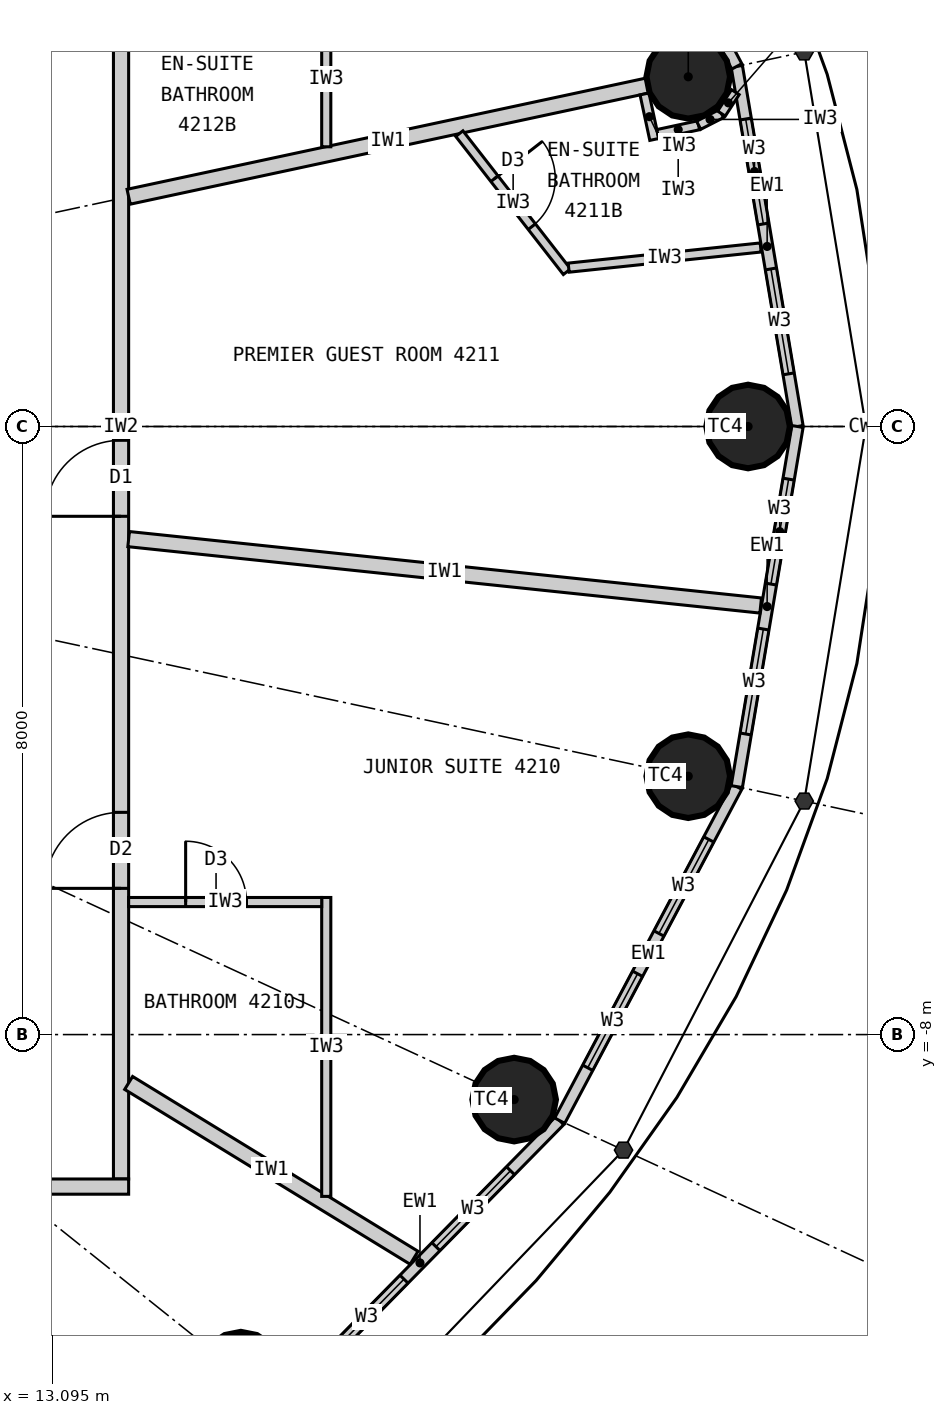
"""IFC4 building model, lengths in metres.
Left out: names, types, materials, properties, quantities, classifications, styles, units other than length and angle.
Written with IfcOpenShell. Run it as: python <this file> out.ifc"""

import sys

from ifc_helpers import new_model, si_unit, direction, frame, frame_2d, origin, origin_2d, place, context, subcontext, project, spatial, rectangle, circle, extrude, element, fill, save


model = new_model("IFC4")
c1 = context("Model", 3, precision=1e-05, world=origin(), true_north=direction((0.0, 1.0)))
c2 = subcontext(c1, "Body", "Model", "MODEL_VIEW")
j1 = project(units=[si_unit("LENGTHUNIT", "METRE"), si_unit("PLANEANGLEUNIT", "RADIAN")], contexts=[c1])
p1 = place(None, origin())
s1 = spatial("IfcSite", under=j1, at=p1, CompositionType="ELEMENT")
p2 = place(p1, origin())
s2 = spatial("IfcBuilding", under=s1, at=p2, CompositionType="ELEMENT")
p3 = place(p2, frame((0.0, 0.0, 159.9)))
s3 = spatial("IfcBuildingStorey", under=s2, at=p3, CompositionType="ELEMENT", Elevation=159.9)
for number, where, z_axis, x_axis in (
    (1, (22.25, 0.0, 0.0), (0.0, 0.0, 1.0), (1.0, 0.0, 0.0)),
    (2, (21.463, 4.601, 0.0), (0.0, 0.0, 1.0), (1.0, 0.0, 0.0)),
    (3, (15.576, -12.461, 0.0), (0.0, 0.0, 1.0), (1.0, 0.0, 0.0)),
    (4, (19.172, -8.855, 0.0), (0.0, 0.0, 1.0), (1.0, 0.0, 0.0)),
    (5, (21.463, -4.601, 0.0), (0.0, 0.0, 1.0), (1.0, 0.0, 0.0)),
):
    element("IfcColumn", number, at=place(p3, frame(where, z_axis=z_axis, x_axis=x_axis)), inside=s3, PredefinedType="COLUMN", context=c2, shape_type="SweptSolid", body=[
        extrude(circle(Radius=0.55, at=origin_2d()), origin(), (0.0, 0.0, 1.0), 3.3),
    ])
p4 = place(p3, frame((22.9, 0.0, 0.0), z_axis=(0.0, 0.0, 1.0), x_axis=(-0.166162111254, 0.986098449843, 0.0)))
e6 = element("IfcWall", 6, at=p4, inside=s3, PredefinedType="ELEMENTEDWALL", context=c2, shape_type="SweptSolid", body=[
    extrude(rectangle(XDim=4.805, YDim=0.15, at=frame_2d((2.402, 0.0))), origin(), (0.0, 0.0, 1.0), 3.12),
])
p5 = place(p4, frame((0.702, 0.0, 0.9)))
e7 = element("IfcOpeningElement", 7, at=p5, cuts=e6, PredefinedType="OPENING", context=c2, shape_type="SweptSolid", body=[
    extrude(rectangle(XDim=1.4, YDim=1.9, at=frame_2d((0.7, 0.95))), frame((0.0, 0.085, 0.0), z_axis=(0.0, -1.0, 0.0), x_axis=(1.0, 0.0, 0.0)), (0.0, 0.0, 1.0), 0.17),
])
p6 = place(p4, frame((2.702, 0.0, 0.9)))
e8 = element("IfcOpeningElement", 8, at=p6, cuts=e6, PredefinedType="OPENING", context=c2, shape_type="SweptSolid", body=[
    extrude(rectangle(XDim=1.4, YDim=1.9, at=frame_2d((0.7, 0.95))), frame((0.0, 0.085, 0.0), z_axis=(0.0, -1.0, 0.0), x_axis=(1.0, 0.0, 0.0)), (0.0, 0.0, 1.0), 0.17),
])
p7 = place(p3, frame((22.102, 4.738, 0.0), z_axis=(0.0, 0.0, 1.0), x_axis=(-0.468428906714, 0.883501193748, 0.0)))
e9 = element("IfcWall", 9, at=p7, inside=s3, PredefinedType="ELEMENTEDWALL", context=c2, shape_type="SweptSolid", body=[
    extrude(rectangle(XDim=4.974, YDim=0.15, at=frame_2d((2.487, 0.0))), origin(), (0.0, 0.0, 1.0), 3.12),
])
p8 = place(p7, frame((0.787, 0.0, 0.9)))
e10 = element("IfcOpeningElement", 10, at=p8, cuts=e9, PredefinedType="OPENING", context=c2, shape_type="SweptSolid", body=[
    extrude(rectangle(XDim=1.4, YDim=1.9, at=frame_2d((0.7, 0.95))), frame((0.0, 0.085, 0.0), z_axis=(0.0, -1.0, 0.0), x_axis=(1.0, 0.0, 0.0)), (0.0, 0.0, 1.0), 0.17),
])
p9 = place(p7, frame((2.787, 0.0, 0.9)))
e11 = element("IfcOpeningElement", 11, at=p9, cuts=e9, PredefinedType="OPENING", context=c2, shape_type="SweptSolid", body=[
    extrude(rectangle(XDim=1.4, YDim=1.9, at=frame_2d((0.7, 0.95))), frame((0.0, 0.085, 0.0), z_axis=(0.0, -1.0, 0.0), x_axis=(1.0, 0.0, 0.0)), (0.0, 0.0, 1.0), 0.17),
])
p10 = place(p3, frame((16.095, -12.876, 0.0), z_axis=(0.0, 0.0, 1.0), x_axis=(0.700727467776, 0.71342905457, 0.0)))
e12 = element("IfcWall", 12, at=p10, inside=s3, PredefinedType="ELEMENTEDWALL", context=c2, shape_type="SweptSolid", body=[
    extrude(rectangle(XDim=5.247, YDim=0.15, at=frame_2d((2.624, 0.0))), origin(), (0.0, 0.0, 1.0), 3.12),
])
p11 = place(p10, frame((0.924, 0.0, 0.9)))
e13 = element("IfcOpeningElement", 13, at=p11, cuts=e12, PredefinedType="OPENING", context=c2, shape_type="SweptSolid", body=[
    extrude(rectangle(XDim=1.4, YDim=1.9, at=frame_2d((0.7, 0.95))), frame((0.0, 0.085, 0.0), z_axis=(0.0, -1.0, 0.0), x_axis=(1.0, 0.0, 0.0)), (0.0, 0.0, 1.0), 0.17),
])
p12 = place(p10, frame((2.924, 0.0, 0.9)))
e14 = element("IfcOpeningElement", 14, at=p12, cuts=e12, PredefinedType="OPENING", context=c2, shape_type="SweptSolid", body=[
    extrude(rectangle(XDim=1.4, YDim=1.9, at=frame_2d((0.7, 0.95))), frame((0.0, 0.085, 0.0), z_axis=(0.0, -1.0, 0.0), x_axis=(1.0, 0.0, 0.0)), (0.0, 0.0, 1.0), 0.17),
])
p13 = place(p3, frame((19.772, -9.132, 0.0), z_axis=(0.0, 0.0, 1.0), x_axis=(0.468428906714, 0.883501193748, 0.0)))
e15 = element("IfcWall", 15, at=p13, inside=s3, PredefinedType="ELEMENTEDWALL", context=c2, shape_type="SweptSolid", body=[
    extrude(rectangle(XDim=4.974, YDim=0.15, at=frame_2d((2.487, 0.0))), origin(), (0.0, 0.0, 1.0), 3.12),
])
p14 = place(p13, frame((0.787, 0.0, 0.9)))
e16 = element("IfcOpeningElement", 16, at=p14, cuts=e15, PredefinedType="OPENING", context=c2, shape_type="SweptSolid", body=[
    extrude(rectangle(XDim=1.4, YDim=1.9, at=frame_2d((0.7, 0.95))), frame((0.0, 0.085, 0.0), z_axis=(0.0, -1.0, 0.0), x_axis=(1.0, 0.0, 0.0)), (0.0, 0.0, 1.0), 0.17),
])
p15 = place(p13, frame((2.787, 0.0, 0.9)))
e17 = element("IfcOpeningElement", 17, at=p15, cuts=e15, PredefinedType="OPENING", context=c2, shape_type="SweptSolid", body=[
    extrude(rectangle(XDim=1.4, YDim=1.9, at=frame_2d((0.7, 0.95))), frame((0.0, 0.085, 0.0), z_axis=(0.0, -1.0, 0.0), x_axis=(1.0, 0.0, 0.0)), (0.0, 0.0, 1.0), 0.17),
])
p16 = place(p3, frame((22.102, -4.738, 0.0), z_axis=(0.0, 0.0, 1.0), x_axis=(0.166162111254, 0.986098449843, 0.0)))
e18 = element("IfcWall", 18, at=p16, inside=s3, PredefinedType="ELEMENTEDWALL", context=c2, shape_type="SweptSolid", body=[
    extrude(rectangle(XDim=4.805, YDim=0.15, at=frame_2d((2.402, 0.0))), origin(), (0.0, 0.0, 1.0), 3.12),
])
p17 = place(p16, frame((0.702, 0.0, 0.9)))
e19 = element("IfcOpeningElement", 19, at=p17, cuts=e18, PredefinedType="OPENING", context=c2, shape_type="SweptSolid", body=[
    extrude(rectangle(XDim=1.4, YDim=1.9, at=frame_2d((0.7, 0.95))), frame((0.0, 0.085, 0.0), z_axis=(0.0, -1.0, 0.0), x_axis=(1.0, 0.0, 0.0)), (0.0, 0.0, 1.0), 0.17),
])
p18 = place(p16, frame((2.702, 0.0, 0.9)))
e20 = element("IfcOpeningElement", 20, at=p18, cuts=e18, PredefinedType="OPENING", context=c2, shape_type="SweptSolid", body=[
    extrude(rectangle(XDim=1.4, YDim=1.9, at=frame_2d((0.7, 0.95))), frame((0.0, 0.085, 0.0), z_axis=(0.0, -1.0, 0.0), x_axis=(1.0, 0.0, 0.0)), (0.0, 0.0, 1.0), 0.17),
])
p19 = place(p3, frame((14.0, -9.9, 0.0), z_axis=(0.0, 0.0, 1.0), x_axis=(0.0, 1.0, 0.0)))
e21 = element("IfcWall", 21, at=p19, inside=s3, PredefinedType="PARTITIONING", context=c2, shape_type="SweptSolid", body=[
    extrude(rectangle(XDim=19.8, YDim=0.2, at=frame_2d((9.9, 0.0))), origin(), (0.0, 0.0, 1.0), 3.12),
])
p20 = place(p19, frame((3.824, 0.0, 0.0)))
e22 = element("IfcOpeningElement", 22, at=p20, cuts=e21, PredefinedType="OPENING", context=c2, shape_type="SweptSolid", body=[
    extrude(rectangle(XDim=1.0, YDim=2.2, at=frame_2d((0.5, 1.1))), frame((0.0, 0.11, 0.0), z_axis=(0.0, -1.0, 0.0), x_axis=(1.0, 0.0, 0.0)), (0.0, 0.0, 1.0), 0.22),
])
p21 = place(p19, frame((8.719, 0.0, 0.0)))
e23 = element("IfcOpeningElement", 23, at=p21, cuts=e21, PredefinedType="OPENING", context=c2, shape_type="SweptSolid", body=[
    extrude(rectangle(XDim=1.0, YDim=2.2, at=frame_2d((0.5, 1.1))), frame((0.0, 0.11, 0.0), z_axis=(0.0, -1.0, 0.0), x_axis=(1.0, 0.0, 0.0)), (0.0, 0.0, 1.0), 0.22),
])
p22 = place(p19, frame((15.482, 0.0, 0.0)))
e24 = element("IfcOpeningElement", 24, at=p22, cuts=e21, PredefinedType="OPENING", context=c2, shape_type="SweptSolid", body=[
    extrude(rectangle(XDim=1.0, YDim=2.2, at=frame_2d((0.5, 1.1))), frame((0.0, 0.11, 0.0), z_axis=(0.0, -1.0, 0.0), x_axis=(1.0, 0.0, 0.0)), (0.0, 0.0, 1.0), 0.22),
])
p23 = place(p3, frame((14.1, 3.022, 0.0), z_axis=(0.0, 0.0, 1.0), x_axis=(0.977790639684, 0.209584028367, 0.0)))
e25 = element("IfcWall", 25, at=p23, inside=s3, PredefinedType="PARTITIONING", context=c2, shape_type="SweptSolid", body=[
    extrude(rectangle(XDim=6.98, YDim=0.2, at=frame_2d((3.49, 0.0))), origin(), (0.0, 0.0, 1.0), 2.42),
])
p24 = place(p3, frame((14.1, -8.636, 0.0), z_axis=(0.0, 0.0, 1.0), x_axis=(0.852731884196, -0.522348862041, 0.0)))
e26 = element("IfcWall", 26, at=p24, inside=s3, PredefinedType="PARTITIONING", context=c2, shape_type="SweptSolid", body=[
    extrude(rectangle(XDim=4.404, YDim=0.2, at=frame_2d((2.202, 0.0))), origin(), (0.0, 0.0, 1.0), 3.12),
])
p25 = place(p3, frame((14.1, -1.481, 0.0), z_axis=(0.0, 0.0, 1.0), x_axis=(0.994524794819, -0.104500873159, 0.0)))
e27 = element("IfcWall", 27, at=p25, inside=s3, PredefinedType="PARTITIONING", context=c2, shape_type="SweptSolid", body=[
    extrude(rectangle(XDim=8.362, YDim=0.2, at=frame_2d((4.181, 0.0))), origin(), (0.0, 0.0, 1.0), 2.47),
])
p26 = place(p3, frame((16.7, -10.129, 0.0), z_axis=(0.0, 0.0, 1.0), x_axis=(0.0, 1.0, 0.0)))
e28 = element("IfcWall", 28, at=p26, inside=s3, PredefinedType="PARTITIONING", context=c2, shape_type="SweptSolid", body=[
    extrude(rectangle(XDim=3.933, YDim=0.12, at=frame_2d((1.966, 0.0))), origin(), (0.0, 0.0, 1.0), 3.12),
])
p27 = place(p3, frame((14.1, -6.256, 0.0), z_axis=(0.0, 0.0, 1.0), x_axis=(1.0, 0.0, 0.0)))
e29 = element("IfcWall", 29, at=p27, inside=s3, PredefinedType="PARTITIONING", context=c2, shape_type="SweptSolid", body=[
    extrude(rectangle(XDim=2.54, YDim=0.12, at=frame_2d((1.27, 0.0))), origin(), (0.0, 0.0, 1.0), 3.12),
])
p28 = place(p27, frame((0.75, 0.0, 0.0)))
e30 = element("IfcOpeningElement", 30, at=p28, cuts=e29, PredefinedType="OPENING", context=c2, shape_type="SweptSolid", body=[
    extrude(rectangle(XDim=0.8, YDim=2.1, at=frame_2d((0.4, 1.05))), frame((0.0, 0.07, 0.0), z_axis=(0.0, -1.0, 0.0), x_axis=(1.0, 0.0, 0.0)), (0.0, 0.0, 1.0), 0.14),
])
p29 = place(p3, frame((18.451, 3.853, 0.0), z_axis=(0.0, 0.0, 1.0), x_axis=(0.614703538382, -0.788758239197, 0.0)))
e31 = element("IfcWall", 31, at=p29, inside=s3, PredefinedType="PARTITIONING", context=c2, shape_type="SweptSolid", body=[
    extrude(rectangle(XDim=2.303, YDim=0.12, at=frame_2d((1.152, 0.0))), origin(), (0.0, 0.0, 1.0), 3.12),
])
p30 = place(p29, frame((0.752, 0.0, 0.0)))
e32 = element("IfcOpeningElement", 32, at=p30, cuts=e31, PredefinedType="OPENING", context=c2, shape_type="SweptSolid", body=[
    extrude(rectangle(XDim=0.8, YDim=2.1, at=frame_2d((0.4, 1.05))), frame((0.0, 0.07, 0.0), z_axis=(0.0, -1.0, 0.0), x_axis=(1.0, 0.0, 0.0)), (0.0, 0.0, 1.0), 0.14),
])
p31 = place(p3, frame((19.89, 2.09, 0.0), z_axis=(0.0, 0.0, 1.0), x_axis=(0.994527025269, 0.104479644, 0.0)))
e33 = element("IfcWall", 33, at=p31, inside=s3, PredefinedType="PARTITIONING", context=c2, shape_type="SweptSolid", body=[
    extrude(rectangle(XDim=2.54, YDim=0.12, at=frame_2d((1.27, 0.0))), origin(), (0.0, 0.0, 1.0), 3.12),
])
p32 = place(p3, frame((20.887, 4.375, 0.0), z_axis=(0.0, 0.0, 1.0), x_axis=(0.209746941802, -0.977755705892, 0.0)))
e34 = element("IfcWall", 34, at=p32, inside=s3, PredefinedType="PARTITIONING", context=c2, shape_type="SweptSolid", body=[
    extrude(rectangle(XDim=0.612, YDim=0.12, at=frame_2d((0.306, 0.0))), origin(), (0.0, 0.0, 1.0), 3.12),
])
p33 = place(p3, frame((21.062, 3.848, 0.0), z_axis=(0.0, 0.0, 1.0), x_axis=(0.977789415726, 0.209589738521, 0.0)))
e35 = element("IfcWall", 35, at=p33, inside=s3, PredefinedType="PARTITIONING", context=c2, shape_type="SweptSolid", body=[
    extrude(rectangle(XDim=0.55, YDim=0.12, at=frame_2d((0.275, 0.0))), origin(), (0.0, 0.0, 1.0), 3.12),
])
p34 = place(p3, frame((21.599, 3.963, 0.0), z_axis=(0.0, 0.0, 1.0), x_axis=(0.890193602875, 0.455582428766, 0.0)))
e36 = element("IfcWall", 36, at=p34, inside=s3, PredefinedType="PARTITIONING", context=c2, shape_type="SweptSolid", body=[
    extrude(rectangle(XDim=0.338, YDim=0.12, at=frame_2d((0.169, 0.0))), origin(), (0.0, 0.0, 1.0), 3.12),
])
p35 = place(p3, frame((21.9, 4.117, 0.0), z_axis=(0.0, 0.0, 1.0), x_axis=(0.543582688681, 0.839355622228, 0.0)))
e37 = element("IfcWall", 37, at=p35, inside=s3, PredefinedType="PARTITIONING", context=c2, shape_type="SweptSolid", body=[
    extrude(rectangle(XDim=0.336, YDim=0.12, at=frame_2d((0.168, 0.0))), origin(), (0.0, 0.0, 1.0), 3.12),
])
p36 = place(p3, frame((16.7, 3.68, 0.0), z_axis=(0.0, 0.0, 1.0), x_axis=(0.0, 1.0, 0.0)))
e38 = element("IfcWall", 38, at=p36, inside=s3, PredefinedType="PARTITIONING", context=c2, shape_type="SweptSolid", body=[
    extrude(rectangle(XDim=1.783, YDim=0.12, at=frame_2d((0.891, 0.0))), origin(), (0.0, 0.0, 1.0), 3.12),
])
p37 = place(p3, frame((14.1, -10.0, 0.0), z_axis=(0.0, 0.0, 1.0), x_axis=(-1.0, 0.0, 0.0)))
e39 = element("IfcWall", 39, at=p37, inside=s3, PredefinedType="PARTITIONING", context=c2, shape_type="SweptSolid", body=[
    extrude(rectangle(XDim=12.43, YDim=0.2, at=frame_2d((6.215, 0.0))), origin(), (0.0, 0.0, 1.0), 3.12),
])
p38 = place(p37, frame((5.25, 0.0, 0.0)))
e40 = element("IfcOpeningElement", 40, at=p38, cuts=e39, PredefinedType="OPENING", context=c2, shape_type="SweptSolid", body=[
    extrude(rectangle(XDim=1.0, YDim=2.2, at=frame_2d((0.5, 1.1))), frame((0.0, 0.11, 0.0), z_axis=(0.0, -1.0, 0.0), x_axis=(1.0, 0.0, 0.0)), (0.0, 0.0, 1.0), 0.22),
])
p39 = place(p5, origin())
e41 = element("IfcWindow", 41, at=p39, inside=s3, PartitioningType="SINGLE_PANEL", PredefinedType="WINDOW", context=c2, shape_type="SweptSolid", body=[
    extrude(rectangle(XDim=1.4, YDim=1.9, at=frame_2d((0.7, 0.95))), frame((0.0, 0.03, 0.0), z_axis=(0.0, -1.0, 0.0), x_axis=(1.0, 0.0, 0.0)), (0.0, 0.0, 1.0), 0.06),
])
fill(e7, e41)
p40 = place(p6, origin())
e42 = element("IfcWindow", 42, at=p40, inside=s3, PartitioningType="SINGLE_PANEL", PredefinedType="WINDOW", context=c2, shape_type="SweptSolid", body=[
    extrude(rectangle(XDim=1.4, YDim=1.9, at=frame_2d((0.7, 0.95))), frame((0.0, 0.03, 0.0), z_axis=(0.0, -1.0, 0.0), x_axis=(1.0, 0.0, 0.0)), (0.0, 0.0, 1.0), 0.06),
])
fill(e8, e42)
p41 = place(p11, origin())
e43 = element("IfcWindow", 43, at=p41, inside=s3, PartitioningType="SINGLE_PANEL", PredefinedType="WINDOW", context=c2, shape_type="SweptSolid", body=[
    extrude(rectangle(XDim=1.4, YDim=1.9, at=frame_2d((0.7, 0.95))), frame((0.0, 0.03, 0.0), z_axis=(0.0, -1.0, 0.0), x_axis=(1.0, 0.0, 0.0)), (0.0, 0.0, 1.0), 0.06),
])
fill(e13, e43)
p42 = place(p12, origin())
e44 = element("IfcWindow", 44, at=p42, inside=s3, PartitioningType="SINGLE_PANEL", PredefinedType="WINDOW", context=c2, shape_type="SweptSolid", body=[
    extrude(rectangle(XDim=1.4, YDim=1.9, at=frame_2d((0.7, 0.95))), frame((0.0, 0.03, 0.0), z_axis=(0.0, -1.0, 0.0), x_axis=(1.0, 0.0, 0.0)), (0.0, 0.0, 1.0), 0.06),
])
fill(e14, e44)
p43 = place(p14, origin())
e45 = element("IfcWindow", 45, at=p43, inside=s3, PartitioningType="SINGLE_PANEL", PredefinedType="WINDOW", context=c2, shape_type="SweptSolid", body=[
    extrude(rectangle(XDim=1.4, YDim=1.9, at=frame_2d((0.7, 0.95))), frame((0.0, 0.03, 0.0), z_axis=(0.0, -1.0, 0.0), x_axis=(1.0, 0.0, 0.0)), (0.0, 0.0, 1.0), 0.06),
])
fill(e16, e45)
p44 = place(p15, origin())
e46 = element("IfcWindow", 46, at=p44, inside=s3, PartitioningType="SINGLE_PANEL", PredefinedType="WINDOW", context=c2, shape_type="SweptSolid", body=[
    extrude(rectangle(XDim=1.4, YDim=1.9, at=frame_2d((0.7, 0.95))), frame((0.0, 0.03, 0.0), z_axis=(0.0, -1.0, 0.0), x_axis=(1.0, 0.0, 0.0)), (0.0, 0.0, 1.0), 0.06),
])
fill(e17, e46)
p45 = place(p17, origin())
e47 = element("IfcWindow", 47, at=p45, inside=s3, PartitioningType="SINGLE_PANEL", PredefinedType="WINDOW", context=c2, shape_type="SweptSolid", body=[
    extrude(rectangle(XDim=1.4, YDim=1.9, at=frame_2d((0.7, 0.95))), frame((0.0, 0.03, 0.0), z_axis=(0.0, -1.0, 0.0), x_axis=(1.0, 0.0, 0.0)), (0.0, 0.0, 1.0), 0.06),
])
fill(e19, e47)
p46 = place(p18, origin())
e48 = element("IfcWindow", 48, at=p46, inside=s3, PartitioningType="SINGLE_PANEL", PredefinedType="WINDOW", context=c2, shape_type="SweptSolid", body=[
    extrude(rectangle(XDim=1.4, YDim=1.9, at=frame_2d((0.7, 0.95))), frame((0.0, 0.03, 0.0), z_axis=(0.0, -1.0, 0.0), x_axis=(1.0, 0.0, 0.0)), (0.0, 0.0, 1.0), 0.06),
])
fill(e20, e48)
p47 = place(p28, origin())
e49 = element("IfcDoor", 49, at=p47, inside=s3, OperationType="SINGLE_SWING_LEFT", PredefinedType="DOOR", context=c2, shape_type="SweptSolid", body=[
    extrude(rectangle(XDim=0.8, YDim=2.1, at=frame_2d((0.4, 1.05))), frame((0.0, 0.025, 0.0), z_axis=(0.0, -1.0, 0.0), x_axis=(1.0, 0.0, 0.0)), (0.0, 0.0, 1.0), 0.05),
])
fill(e30, e49)
p48 = place(p20, origin())
e50 = element("IfcDoor", 50, at=p48, inside=s3, OperationType="SINGLE_SWING_LEFT", PredefinedType="DOOR", context=c2, shape_type="SweptSolid", body=[
    extrude(rectangle(XDim=1.0, YDim=2.2, at=frame_2d((0.5, 1.1))), frame((0.0, 0.025, 0.0), z_axis=(0.0, -1.0, 0.0), x_axis=(1.0, 0.0, 0.0)), (0.0, 0.0, 1.0), 0.05),
])
fill(e22, e50)
p49 = place(p30, origin())
e51 = element("IfcDoor", 51, at=p49, inside=s3, OperationType="SINGLE_SWING_LEFT", PredefinedType="DOOR", context=c2, shape_type="SweptSolid", body=[
    extrude(rectangle(XDim=0.8, YDim=2.1, at=frame_2d((0.4, 1.05))), frame((0.0, 0.025, 0.0), z_axis=(0.0, -1.0, 0.0), x_axis=(1.0, 0.0, 0.0)), (0.0, 0.0, 1.0), 0.05),
])
fill(e32, e51)
p50 = place(p21, origin())
e52 = element("IfcDoor", 52, at=p50, inside=s3, OperationType="SINGLE_SWING_LEFT", PredefinedType="DOOR", context=c2, shape_type="SweptSolid", body=[
    extrude(rectangle(XDim=1.0, YDim=2.2, at=frame_2d((0.5, 1.1))), frame((0.0, 0.025, 0.0), z_axis=(0.0, -1.0, 0.0), x_axis=(1.0, 0.0, 0.0)), (0.0, 0.0, 1.0), 0.05),
])
fill(e23, e52)
save(model, sys.argv[1])
